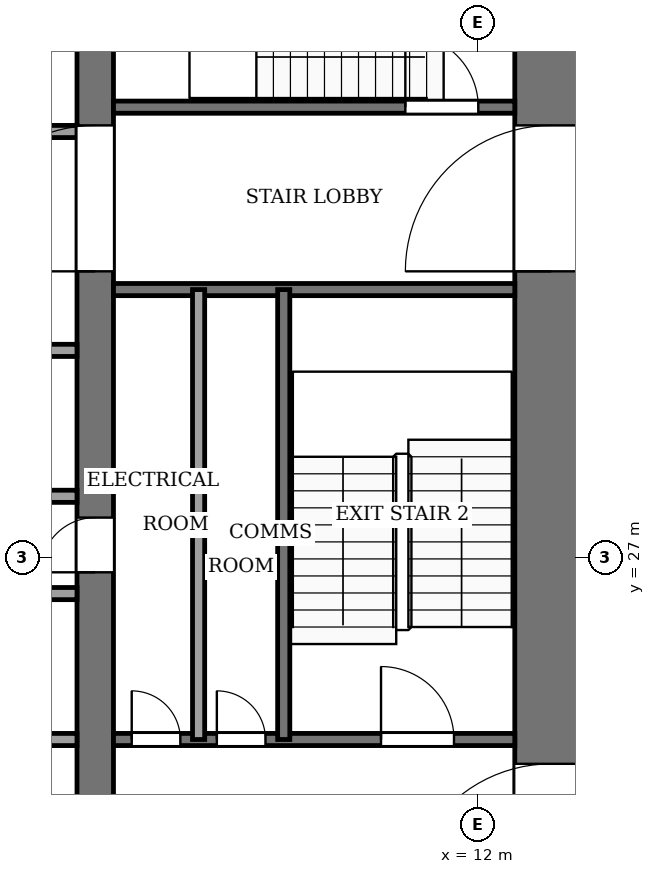
"""IFC4 building model, lengths in metres.
Left out: names, types, materials, properties, quantities, classifications, styles, units other than length and angle.
Written with IfcOpenShell. Run it as: python <this file> out.ifc"""

import sys

from ifc_helpers import new_model, si_unit, direction, frame, frame_2d, origin, place, context, subcontext, project, spatial, rectangle, extrude, element, fill, save


model = new_model("IFC4")
c1 = context("Model", 3, precision=1e-05, world=origin(), true_north=direction((0.0, 1.0)))
c2 = subcontext(c1, "Body", "Model", "MODEL_VIEW")
j1 = project(units=[si_unit("LENGTHUNIT", "METRE"), si_unit("PLANEANGLEUNIT", "RADIAN")], contexts=[c1])
p1 = place(None, origin())
s1 = spatial("IfcSite", under=j1, at=p1, CompositionType="ELEMENT")
p2 = place(p1, origin())
s2 = spatial("IfcBuilding", under=s1, at=p2, CompositionType="ELEMENT")
p3 = place(p2, frame((0.0, 0.0, 78.0)))
s3 = spatial("IfcBuildingStorey", under=s2, at=p3, CompositionType="ELEMENT", Elevation=78.0)
p4 = place(p3, frame((13.2, 18.4, -0.13), z_axis=(0.0, 0.0, 1.0), x_axis=(0.0, 1.0, 0.0)))
e1 = element("IfcWall", 1, at=p4, inside=s3, PredefinedType="SHEAR", context=c2, shape_type="SweptSolid", body=[
    extrude(rectangle(XDim=19.2, YDim=1.2, at=frame_2d((9.6, 0.0))), origin(), (0.0, 0.0, 1.0), 4.0),
])
p5 = place(p4, frame((2.8, 0.0, 0.13)))
e2 = element("IfcOpeningElement", 2, at=p5, cuts=e1, PredefinedType="OPENING", context=c2, shape_type="SweptSolid", body=[
    extrude(rectangle(XDim=2.4, YDim=2.4, at=frame_2d((1.2, 1.2))), frame((0.0, 0.61, 0.0), z_axis=(0.0, -1.0, 0.0), x_axis=(1.0, 0.0, 0.0)), (0.0, 0.0, 1.0), 1.22),
])
p6 = place(p4, frame((13.3, 0.0, 0.13)))
e3 = element("IfcOpeningElement", 3, at=p6, cuts=e1, PredefinedType="OPENING", context=c2, shape_type="SweptSolid", body=[
    extrude(rectangle(XDim=2.4, YDim=2.4, at=frame_2d((1.2, 1.2))), frame((0.0, 0.61, 0.0), z_axis=(0.0, -1.0, 0.0), x_axis=(1.0, 0.0, 0.0)), (0.0, 0.0, 1.0), 1.22),
])
p7 = place(p3, frame((5.7, 18.4, -0.13), z_axis=(0.0, 0.0, 1.0), x_axis=(0.0, 1.0, 0.0)))
e4 = element("IfcWall", 4, at=p7, inside=s3, PredefinedType="SHEAR", context=c2, shape_type="SweptSolid", body=[
    extrude(rectangle(XDim=19.2, YDim=0.6, at=frame_2d((9.6, 0.0))), origin(), (0.0, 0.0, 1.0), 4.0),
])
p8 = place(p7, frame((8.35, 0.0, 0.13)))
e5 = element("IfcOpeningElement", 5, at=p8, cuts=e4, PredefinedType="OPENING", context=c2, shape_type="SweptSolid", body=[
    extrude(rectangle(XDim=0.9, YDim=2.1, at=frame_2d((0.45, 1.05))), frame((0.0, 0.31, 0.0), z_axis=(0.0, -1.0, 0.0), x_axis=(1.0, 0.0, 0.0)), (0.0, 0.0, 1.0), 0.62),
])
p9 = place(p7, frame((13.3, 0.0, 0.13)))
e6 = element("IfcOpeningElement", 6, at=p9, cuts=e4, PredefinedType="OPENING", context=c2, shape_type="SweptSolid", body=[
    extrude(rectangle(XDim=2.4, YDim=2.4, at=frame_2d((1.2, 1.2))), frame((0.0, 0.31, 0.0), z_axis=(0.0, -1.0, 0.0), x_axis=(1.0, 0.0, 0.0)), (0.0, 0.0, 1.0), 0.62),
])
p10 = place(p3, frame((-5.4, 24.0, 0.0), z_axis=(0.0, 0.0, 1.0), x_axis=(1.0, 0.0, 0.0)))
e7 = element("IfcWall", 7, at=p10, inside=s3, PredefinedType="PARTITIONING", context=c2, shape_type="SweptSolid", body=[
    extrude(rectangle(XDim=10.8, YDim=0.2, at=frame_2d((5.4, 0.0))), origin(), (0.0, 0.0, 1.0), 3.87),
])
p11 = place(p10, frame((0.75, 0.0, 0.0)))
e8 = element("IfcOpeningElement", 8, at=p11, cuts=e7, PredefinedType="OPENING", context=c2, shape_type="SweptSolid", body=[
    extrude(rectangle(XDim=1.2, YDim=2.2, at=frame_2d((0.6, 1.1))), frame((0.0, 0.11, 0.0), z_axis=(0.0, -1.0, 0.0), x_axis=(1.0, 0.0, 0.0)), (0.0, 0.0, 1.0), 0.22),
])
p12 = place(p10, frame((3.45, 0.0, 0.0)))
e9 = element("IfcOpeningElement", 9, at=p12, cuts=e7, PredefinedType="OPENING", context=c2, shape_type="SweptSolid", body=[
    extrude(rectangle(XDim=1.2, YDim=2.2, at=frame_2d((0.6, 1.1))), frame((0.0, 0.11, 0.0), z_axis=(0.0, -1.0, 0.0), x_axis=(1.0, 0.0, 0.0)), (0.0, 0.0, 1.0), 0.22),
])
p13 = place(p10, frame((6.15, 0.0, 0.0)))
e10 = element("IfcOpeningElement", 10, at=p13, cuts=e7, PredefinedType="OPENING", context=c2, shape_type="SweptSolid", body=[
    extrude(rectangle(XDim=1.2, YDim=2.2, at=frame_2d((0.6, 1.1))), frame((0.0, 0.11, 0.0), z_axis=(0.0, -1.0, 0.0), x_axis=(1.0, 0.0, 0.0)), (0.0, 0.0, 1.0), 0.22),
])
p14 = place(p10, frame((8.85, 0.0, 0.0)))
e11 = element("IfcOpeningElement", 11, at=p14, cuts=e7, PredefinedType="OPENING", context=c2, shape_type="SweptSolid", body=[
    extrude(rectangle(XDim=1.2, YDim=2.2, at=frame_2d((0.6, 1.1))), frame((0.0, 0.11, 0.0), z_axis=(0.0, -1.0, 0.0), x_axis=(1.0, 0.0, 0.0)), (0.0, 0.0, 1.0), 0.22),
])
p15 = place(p3, frame((6.0, 24.0, 0.0), z_axis=(0.0, 0.0, 1.0), x_axis=(1.0, 0.0, 0.0)))
e12 = element("IfcWall", 12, at=p15, inside=s3, PredefinedType="PARTITIONING", context=c2, shape_type="SweptSolid", body=[
    extrude(rectangle(XDim=6.6, YDim=0.2, at=frame_2d((3.3, 0.0))), origin(), (0.0, 0.0, 1.0), 3.87),
])
p16 = place(p15, frame((0.3, 0.0, 0.0)))
e13 = element("IfcOpeningElement", 13, at=p16, cuts=e12, PredefinedType="OPENING", context=c2, shape_type="SweptSolid", body=[
    extrude(rectangle(XDim=0.8, YDim=2.1, at=frame_2d((0.4, 1.05))), frame((0.0, 0.11, 0.0), z_axis=(0.0, -1.0, 0.0), x_axis=(1.0, 0.0, 0.0)), (0.0, 0.0, 1.0), 0.22),
])
p17 = place(p15, frame((1.7, 0.0, 0.0)))
e14 = element("IfcOpeningElement", 14, at=p17, cuts=e12, PredefinedType="OPENING", context=c2, shape_type="SweptSolid", body=[
    extrude(rectangle(XDim=0.8, YDim=2.1, at=frame_2d((0.4, 1.05))), frame((0.0, 0.11, 0.0), z_axis=(0.0, -1.0, 0.0), x_axis=(1.0, 0.0, 0.0)), (0.0, 0.0, 1.0), 0.22),
])
p18 = place(p15, frame((4.4, 0.0, 0.0)))
e15 = element("IfcOpeningElement", 15, at=p18, cuts=e12, PredefinedType="OPENING", context=c2, shape_type="SweptSolid", body=[
    extrude(rectangle(XDim=1.2, YDim=2.2, at=frame_2d((0.6, 1.1))), frame((0.0, 0.11, 0.0), z_axis=(0.0, -1.0, 0.0), x_axis=(1.0, 0.0, 0.0)), (0.0, 0.0, 1.0), 0.22),
])
for number, where, z_axis, x_axis in (
    (16, (-5.4, 26.4, 0.0), (0.0, 0.0, 1.0), (1.0, 0.0, 0.0)),
    (17, (-5.4, 28.0, 0.0), (0.0, 0.0, 1.0), (1.0, 0.0, 0.0)),
    (18, (-5.4, 30.4, 0.0), (0.0, 0.0, 1.0), (1.0, 0.0, 0.0)),
):
    element("IfcWall", number, at=place(p3, frame(where, z_axis=z_axis, x_axis=x_axis)), inside=s3, PredefinedType="PARTITIONING", context=c2, shape_type="SweptSolid", body=[
        extrude(rectangle(XDim=10.8, YDim=0.2, at=frame_2d((5.4, 0.0))), origin(), (0.0, 0.0, 1.0), 3.87),
    ])
p19 = place(p3, frame((6.0, 31.4, 0.0), z_axis=(0.0, 0.0, 1.0), x_axis=(1.0, 0.0, 0.0)))
e19 = element("IfcWall", 19, at=p19, inside=s3, PredefinedType="PARTITIONING", context=c2, shape_type="SweptSolid", body=[
    extrude(rectangle(XDim=6.6, YDim=0.2, at=frame_2d((3.3, 0.0))), origin(), (0.0, 0.0, 1.0), 3.87),
])
p20 = place(p3, frame((-5.4, 34.0, 0.0), z_axis=(0.0, 0.0, 1.0), x_axis=(1.0, 0.0, 0.0)))
e20 = element("IfcWall", 20, at=p20, inside=s3, PredefinedType="PARTITIONING", context=c2, shape_type="SweptSolid", body=[
    extrude(rectangle(XDim=10.8, YDim=0.2, at=frame_2d((5.4, 0.0))), origin(), (0.0, 0.0, 1.0), 3.87),
])
p21 = place(p20, frame((6.15, 0.0, 0.0)))
e21 = element("IfcOpeningElement", 21, at=p21, cuts=e20, PredefinedType="OPENING", context=c2, shape_type="SweptSolid", body=[
    extrude(rectangle(XDim=1.2, YDim=2.2, at=frame_2d((0.6, 1.1))), frame((0.0, 0.11, 0.0), z_axis=(0.0, -1.0, 0.0), x_axis=(1.0, 0.0, 0.0)), (0.0, 0.0, 1.0), 0.22),
])
p22 = place(p20, frame((8.95, 0.0, 0.0)))
e22 = element("IfcOpeningElement", 22, at=p22, cuts=e20, PredefinedType="OPENING", context=c2, shape_type="SweptSolid", body=[
    extrude(rectangle(XDim=1.0, YDim=2.1, at=frame_2d((0.5, 1.05))), frame((0.0, 0.11, 0.0), z_axis=(0.0, -1.0, 0.0), x_axis=(1.0, 0.0, 0.0)), (0.0, 0.0, 1.0), 0.22),
])
p23 = place(p3, frame((6.0, 34.4, 0.0), z_axis=(0.0, 0.0, 1.0), x_axis=(1.0, 0.0, 0.0)))
e23 = element("IfcWall", 23, at=p23, inside=s3, PredefinedType="PARTITIONING", context=c2, shape_type="SweptSolid", body=[
    extrude(rectangle(XDim=6.6, YDim=0.2, at=frame_2d((3.3, 0.0))), origin(), (0.0, 0.0, 1.0), 3.87),
])
p24 = place(p23, frame((4.8, 0.0, 0.0)))
e24 = element("IfcOpeningElement", 24, at=p24, cuts=e23, PredefinedType="OPENING", context=c2, shape_type="SweptSolid", body=[
    extrude(rectangle(XDim=1.2, YDim=2.2, at=frame_2d((0.6, 1.1))), frame((0.0, 0.11, 0.0), z_axis=(0.0, -1.0, 0.0), x_axis=(1.0, 0.0, 0.0)), (0.0, 0.0, 1.0), 0.22),
])
for number, where, z_axis, x_axis in (
    (25, (7.4, 24.0, 0.0), (0.0, 0.0, 1.0), (0.0, 1.0, 0.0)),
    (26, (8.8, 24.0, 0.0), (0.0, 0.0, 1.0), (0.0, 1.0, 0.0)),
):
    element("IfcWall", number, at=place(p3, frame(where, z_axis=z_axis, x_axis=x_axis)), inside=s3, PredefinedType="PARTITIONING", context=c2, shape_type="SweptSolid", body=[
        extrude(rectangle(XDim=7.4, YDim=0.2, at=frame_2d((3.7, 0.0))), origin(), (0.0, 0.0, 1.0), 3.87),
    ])
p25 = place(p16, origin())
e27 = element("IfcDoor", 27, at=p25, inside=s3, OperationType="SINGLE_SWING_RIGHT", PredefinedType="DOOR", context=c2, shape_type="SweptSolid", body=[
    extrude(rectangle(XDim=0.8, YDim=2.1, at=frame_2d((0.4, 1.05))), frame((0.0, 0.025, 0.0), z_axis=(0.0, -1.0, 0.0), x_axis=(1.0, 0.0, 0.0)), (0.0, 0.0, 1.0), 0.05),
])
fill(e13, e27)
p26 = place(p17, origin())
e28 = element("IfcDoor", 28, at=p26, inside=s3, OperationType="SINGLE_SWING_LEFT", PredefinedType="DOOR", context=c2, shape_type="SweptSolid", body=[
    extrude(rectangle(XDim=0.8, YDim=2.1, at=frame_2d((0.4, 1.05))), frame((0.0, 0.025, 0.0), z_axis=(0.0, -1.0, 0.0), x_axis=(1.0, 0.0, 0.0)), (0.0, 0.0, 1.0), 0.05),
])
fill(e14, e28)
p27 = place(p8, origin())
e29 = element("IfcDoor", 29, at=p27, inside=s3, OperationType="SINGLE_SWING_RIGHT", PredefinedType="DOOR", context=c2, shape_type="SweptSolid", body=[
    extrude(rectangle(XDim=0.9, YDim=2.1, at=frame_2d((0.45, 1.05))), frame((0.0, 0.025, 0.0), z_axis=(0.0, -1.0, 0.0), x_axis=(1.0, 0.0, 0.0)), (0.0, 0.0, 1.0), 0.05),
])
fill(e5, e29)
p28 = place(p18, origin())
e30 = element("IfcDoor", 30, at=p28, inside=s3, OperationType="SINGLE_SWING_LEFT", PredefinedType="DOOR", context=c2, shape_type="SweptSolid", body=[
    extrude(rectangle(XDim=1.2, YDim=2.2, at=frame_2d((0.6, 1.1))), frame((0.0, 0.025, 0.0), z_axis=(0.0, -1.0, 0.0), x_axis=(1.0, 0.0, 0.0)), (0.0, 0.0, 1.0), 0.05),
])
fill(e15, e30)
p29 = place(p24, origin())
e31 = element("IfcDoor", 31, at=p29, inside=s3, OperationType="SINGLE_SWING_RIGHT", PredefinedType="DOOR", context=c2, shape_type="SweptSolid", body=[
    extrude(rectangle(XDim=1.2, YDim=2.2, at=frame_2d((0.6, 1.1))), frame((0.0, 0.025, 0.0), z_axis=(0.0, -1.0, 0.0), x_axis=(1.0, 0.0, 0.0)), (0.0, 0.0, 1.0), 0.05),
])
fill(e24, e31)
p30 = place(p9, origin())
e32 = element("IfcDoor", 32, at=p30, inside=s3, OperationType="DOUBLE_DOOR_SINGLE_SWING", PredefinedType="DOOR", context=c2, shape_type="SweptSolid", body=[
    extrude(rectangle(XDim=2.4, YDim=2.4, at=frame_2d((1.2, 1.2))), frame((0.0, 0.025, 0.0), z_axis=(0.0, -1.0, 0.0), x_axis=(1.0, 0.0, 0.0)), (0.0, 0.0, 1.0), 0.05),
])
fill(e6, e32)
p31 = place(p5, origin())
e33 = element("IfcDoor", 33, at=p31, inside=s3, OperationType="DOUBLE_DOOR_SINGLE_SWING", PredefinedType="DOOR", context=c2, shape_type="SweptSolid", body=[
    extrude(rectangle(XDim=2.4, YDim=2.4, at=frame_2d((1.2, 1.2))), frame((0.0, 0.025, 0.0), z_axis=(0.0, -1.0, 0.0), x_axis=(1.0, 0.0, 0.0)), (0.0, 0.0, 1.0), 0.05),
])
fill(e2, e33)
p32 = place(p6, origin())
e34 = element("IfcDoor", 34, at=p32, inside=s3, OperationType="DOUBLE_DOOR_SINGLE_SWING", PredefinedType="DOOR", context=c2, shape_type="SweptSolid", body=[
    extrude(rectangle(XDim=2.4, YDim=2.4, at=frame_2d((1.2, 1.2))), frame((0.0, 0.025, 0.0), z_axis=(0.0, -1.0, 0.0), x_axis=(1.0, 0.0, 0.0)), (0.0, 0.0, 1.0), 0.05),
])
fill(e3, e34)
save(model, sys.argv[1])
